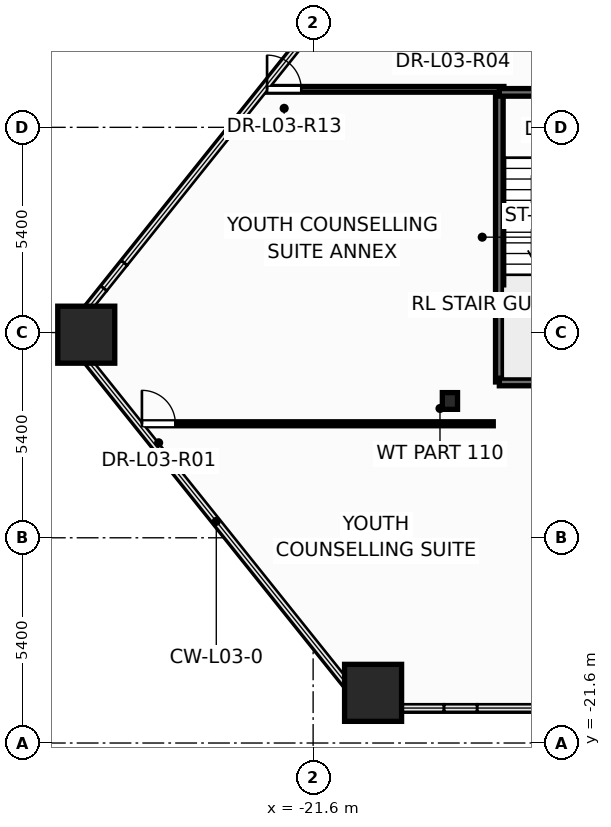
"""IFC4 building model, lengths in metres.
Left out: names, types, materials, properties, quantities, classifications, styles, units other than length and angle.
Written with IfcOpenShell. Run it as: python <this file> out.ifc"""

import sys

from ifc_helpers import new_model, si_unit, direction, frame, frame_2d, origin, origin_2d, place, context, subcontext, project, spatial, rectangle, hollow_rectangle, i_section, extrude, element, fill, save


model = new_model("IFC4")
c1 = context("Model", 3, precision=1e-05, world=origin(), true_north=direction((0.0, 1.0)))
c2 = subcontext(c1, "Body", "Model", "MODEL_VIEW")
j1 = project(units=[si_unit("LENGTHUNIT", "METRE"), si_unit("PLANEANGLEUNIT", "RADIAN")], contexts=[c1])
p1 = place(None, origin())
s1 = spatial("IfcSite", under=j1, at=p1, CompositionType="ELEMENT")
p2 = place(p1, origin())
s2 = spatial("IfcBuilding", under=s1, at=p2, CompositionType="ELEMENT")
p3 = place(p2, frame((0.0, 0.0, 14.4)))
s3 = spatial("IfcBuildingStorey", under=s2, at=p3, CompositionType="ELEMENT", Elevation=14.4)
for number, where, z_axis, x_axis in (
    (1, (-27.57, -10.856, 0.0), (0.0, 0.0, 1.0), (1.0, 0.0, 0.0)),
    (2, (-20.022, -20.28, 0.0), (0.0, 0.0, 1.0), (1.0, 0.0, 0.0)),
):
    element("IfcColumn", number, at=place(p3, frame(where, z_axis=z_axis, x_axis=x_axis)), inside=s3, PredefinedType="COLUMN", context=c2, shape_type="SweptSolid", body=[
        extrude(hollow_rectangle(XDim=1.5, YDim=1.5, WallThickness=0.075, at=origin_2d()), origin(), (0.0, 0.0, 1.0), 4.5),
    ])
p4 = place(p3, frame((-18.0, -12.6, 0.0), z_axis=(0.0, 0.0, 1.0), x_axis=(1.0, 0.0, 0.0)))
e3 = element("IfcColumn", 3, at=p4, inside=s3, PredefinedType="COLUMN", context=c2, shape_type="SweptSolid", body=[
    extrude(i_section(OverallWidth=0.4, OverallDepth=0.44, WebThickness=0.028, FlangeThickness=0.04, at=origin_2d()), origin(), (0.0, 0.0, 1.0), 4.5),
])
p5 = place(p3, frame((-26.205, -13.2, 0.0), z_axis=(0.0, 0.0, 1.0), x_axis=(1.0, 0.0, 0.0)))
e4 = element("IfcWall", 4, at=p5, inside=s3, PredefinedType="PARTITIONING", context=c2, shape_type="SweptSolid", body=[
    extrude(rectangle(XDim=9.345, YDim=0.105, at=frame_2d((4.672, 0.0))), origin(), (0.0, 0.0, 1.0), 3.463),
])
p6 = place(p5, frame((0.1, 0.0, 0.0)))
e5 = element("IfcOpeningElement", 5, at=p6, cuts=e4, PredefinedType="OPENING", context=c2, shape_type="SweptSolid", body=[
    extrude(rectangle(XDim=0.886, YDim=2.104, at=frame_2d((0.44, 1.052))), frame((0.0, 0.062, 0.0), z_axis=(0.0, -1.0, 0.0), x_axis=(1.0, 0.0, 0.0)), (0.0, 0.0, 1.0), 0.125),
])
p7 = place(p3, frame((-16.7, -12.1, 0.0), z_axis=(0.0, 0.0, 1.0), x_axis=(0.0, 1.0, 0.0)))
e6 = element("IfcWall", 6, at=p7, inside=s3, PredefinedType="SOLIDWALL", context=c2, shape_type="SweptSolid", body=[
    extrude(rectangle(XDim=7.62, YDim=0.2, at=frame_2d((3.81, 0.0))), origin(), (0.0, 0.0, 1.0), 4.5),
])
p8 = place(p3, frame((-22.912, -4.4, 0.0), z_axis=(0.0, 0.0, 1.0), x_axis=(1.0, 0.0, 0.0)))
e7 = element("IfcWall", 7, at=p8, inside=s3, PredefinedType="PARTITIONING", context=c2, shape_type="SweptSolid", body=[
    extrude(rectangle(XDim=6.332, YDim=0.15, at=frame_2d((3.166, 0.0))), origin(), (0.0, 0.0, 1.0), 3.463),
])
p9 = place(p8, frame((0.1, 0.0, 0.0)))
e8 = element("IfcOpeningElement", 8, at=p9, cuts=e7, PredefinedType="OPENING", context=c2, shape_type="SweptSolid", body=[
    extrude(rectangle(XDim=0.906, YDim=2.104, at=frame_2d((0.45, 1.052))), frame((0.0, 0.085, 0.0), z_axis=(0.0, -1.0, 0.0), x_axis=(1.0, 0.0, 0.0)), (0.0, 0.0, 1.0), 0.17),
])
p10 = place(p3, frame((-16.7, -12.1, 0.0), z_axis=(0.0, 0.0, 1.0), x_axis=(1.0, 0.0, 0.0)))
e9 = element("IfcWall", 9, at=p10, inside=s3, PredefinedType="SOLIDWALL", context=c2, shape_type="SweptSolid", body=[
    extrude(rectangle(XDim=3.4, YDim=0.2, at=frame_2d((1.7, 0.0))), origin(), (0.0, 0.0, 1.0), 4.5),
])
p11 = place(p3, frame((-16.7, -4.48, 0.0), z_axis=(0.0, 0.0, 1.0), x_axis=(1.0, 0.0, 0.0)))
e10 = element("IfcWall", 10, at=p11, inside=s3, PredefinedType="SOLIDWALL", context=c2, shape_type="SweptSolid", body=[
    extrude(rectangle(XDim=3.4, YDim=0.2, at=frame_2d((1.7, 0.0))), origin(), (0.0, 0.0, 1.0), 4.5),
])
p12 = place(p11, frame((1.25, 0.0, 0.0)))
e11 = element("IfcOpeningElement", 11, at=p12, cuts=e10, PredefinedType="OPENING", context=c2, shape_type="SweptSolid", body=[
    extrude(rectangle(XDim=1.006, YDim=2.104, at=frame_2d((0.5, 1.052))), frame((0.0, 0.11, 0.0), z_axis=(0.0, -1.0, 0.0), x_axis=(1.0, 0.0, 0.0)), (0.0, 0.0, 1.0), 0.22),
])
p13 = place(p6, origin())
e12 = element("IfcDoor", 12, at=p13, inside=s3, OperationType="SINGLE_SWING_LEFT", PredefinedType="DOOR", context=c2, shape_type="SweptSolid", body=[
    extrude(rectangle(XDim=0.88, YDim=2.1, at=frame_2d((0.44, 1.05))), frame((0.0, 0.025, 0.0), z_axis=(0.0, -1.0, 0.0), x_axis=(1.0, 0.0, 0.0)), (0.0, 0.0, 1.0), 0.05),
])
fill(e5, e12)
p14 = place(p9, origin())
e13 = element("IfcDoor", 13, at=p14, inside=s3, OperationType="SINGLE_SWING_LEFT", PredefinedType="DOOR", context=c2, shape_type="SweptSolid", body=[
    extrude(rectangle(XDim=0.9, YDim=2.1, at=frame_2d((0.45, 1.05))), frame((0.0, 0.025, 0.0), z_axis=(0.0, -1.0, 0.0), x_axis=(1.0, 0.0, 0.0)), (0.0, 0.0, 1.0), 0.05),
])
fill(e8, e13)
save(model, sys.argv[1])
